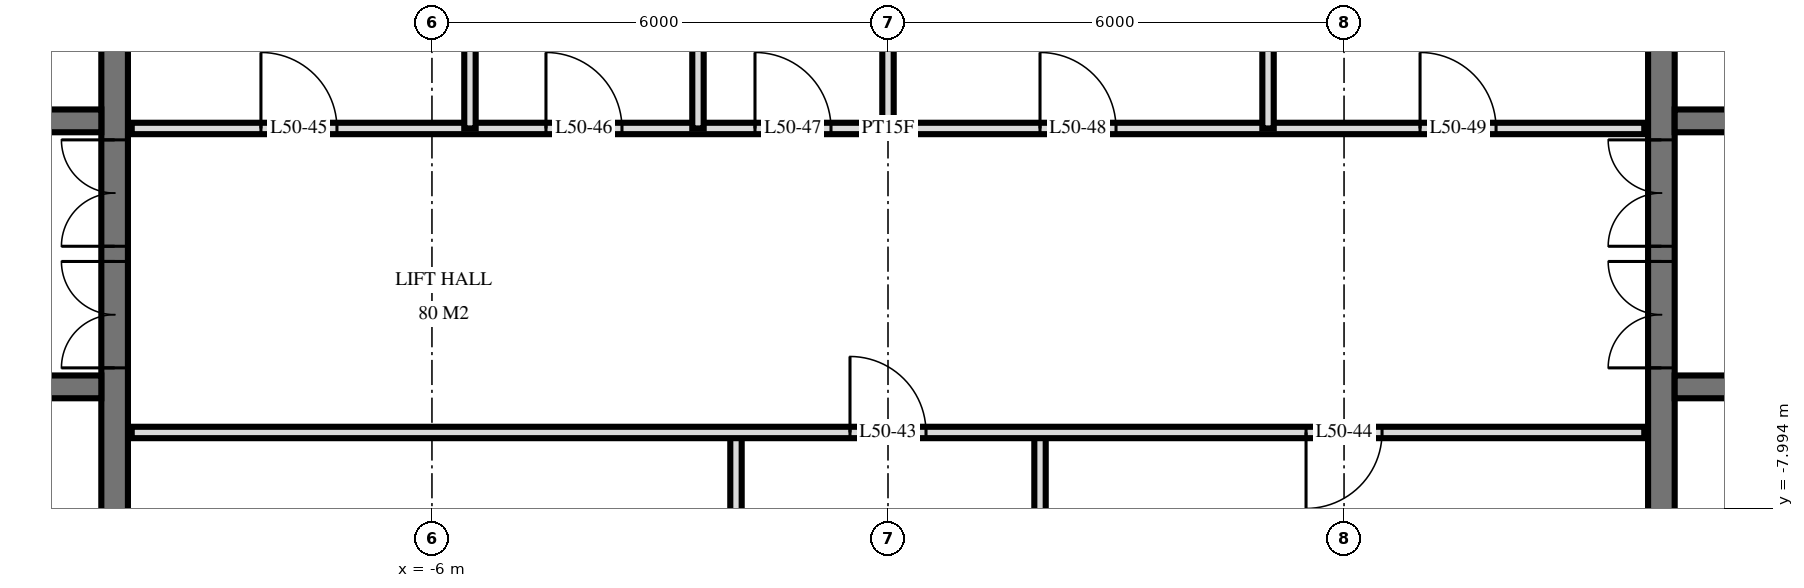
"""IFC4 building model, lengths in metres.
Left out: names, types, materials, properties, quantities, classifications, styles, units other than length and angle.
Written with IfcOpenShell. Run it as: python <this file> out.ifc"""

import sys

from ifc_helpers import new_model, si_unit, direction, frame, frame_2d, origin, place, context, subcontext, project, spatial, rectangle, extrude, element, fill, save


model = new_model("IFC4")
c1 = context("Model", 3, precision=1e-05, world=origin(), true_north=direction((0.0, 1.0)))
c2 = subcontext(c1, "Body", "Model", "MODEL_VIEW")
j1 = project(units=[si_unit("LENGTHUNIT", "METRE"), si_unit("PLANEANGLEUNIT", "RADIAN")], contexts=[c1])
p1 = place(None, origin())
s1 = spatial("IfcSite", under=j1, at=p1, CompositionType="ELEMENT")
p2 = place(p1, origin())
s2 = spatial("IfcBuilding", under=s1, at=p2, CompositionType="ELEMENT")
p3 = place(p2, frame((0.0, 0.0, 194.1)))
s3 = spatial("IfcBuildingStorey", under=s2, at=p3, CompositionType="ELEMENT", Elevation=194.1)
p4 = place(p3, frame((-10.175, -14.55, 0.0), z_axis=(0.0, 0.0, 1.0), x_axis=(0.0, 1.0, 0.0)))
e1 = element("IfcWall", 1, at=p4, inside=s3, PredefinedType="SHEAR", context=c2, shape_type="SweptSolid", body=[
    extrude(rectangle(XDim=14.1, YDim=0.35, at=frame_2d((7.05, 0.0))), origin(), (0.0, 0.0, 1.0), 3.5),
])
p5 = place(p4, frame((8.4, 0.0, 0.0)))
e2 = element("IfcOpeningElement", 2, at=p5, cuts=e1, PredefinedType="OPENING", context=c2, shape_type="SweptSolid", body=[
    extrude(rectangle(XDim=1.4, YDim=2.4, at=frame_2d((0.7, 1.2))), frame((0.0, 0.185, 0.0), z_axis=(0.0, -1.0, 0.0), x_axis=(1.0, 0.0, 0.0)), (0.0, 0.0, 1.0), 0.37),
])
p6 = place(p4, frame((10.0, 0.0, 0.0)))
e3 = element("IfcOpeningElement", 3, at=p6, cuts=e1, PredefinedType="OPENING", context=c2, shape_type="SweptSolid", body=[
    extrude(rectangle(XDim=1.4, YDim=2.4, at=frame_2d((0.7, 1.2))), frame((0.0, 0.185, 0.0), z_axis=(0.0, -1.0, 0.0), x_axis=(1.0, 0.0, 0.0)), (0.0, 0.0, 1.0), 0.37),
])
p7 = place(p4, frame((4.0, 0.0, 0.0)))
e4 = element("IfcOpeningElement", 4, at=p7, cuts=e1, PredefinedType="OPENING", context=c2, shape_type="SweptSolid", body=[
    extrude(rectangle(XDim=1.2, YDim=2.1, at=frame_2d((0.6, 1.05))), frame((0.0, 0.185, 0.0), z_axis=(0.0, -1.0, 0.0), x_axis=(1.0, 0.0, 0.0)), (0.0, 0.0, 1.0), 0.37),
])
p8 = place(p3, frame((-24.05, -2.9, 0.0), z_axis=(0.0, 0.0, 1.0), x_axis=(1.0, 0.0, 0.0)))
e5 = element("IfcWall", 5, at=p8, inside=s3, PredefinedType="SHEAR", context=c2, shape_type="SweptSolid", body=[
    extrude(rectangle(XDim=13.7, YDim=0.3, at=frame_2d((6.85, 0.0))), origin(), (0.0, 0.0, 1.0), 3.5),
])
p9 = place(p8, frame((0.55, 0.0, 0.0)))
e6 = element("IfcOpeningElement", 6, at=p9, cuts=e5, PredefinedType="OPENING", context=c2, shape_type="SweptSolid", body=[
    extrude(rectangle(XDim=1.1, YDim=2.1, at=frame_2d((0.55, 1.05))), frame((0.0, 0.16, 0.0), z_axis=(0.0, -1.0, 0.0), x_axis=(1.0, 0.0, 0.0)), (0.0, 0.0, 1.0), 0.32),
])
p10 = place(p8, frame((5.9, 0.0, 0.0)))
e7 = element("IfcOpeningElement", 7, at=p10, cuts=e5, PredefinedType="OPENING", context=c2, shape_type="SweptSolid", body=[
    extrude(rectangle(XDim=0.9, YDim=2.1, at=frame_2d((0.45, 1.05))), frame((0.0, 0.16, 0.0), z_axis=(0.0, -1.0, 0.0), x_axis=(1.0, 0.0, 0.0)), (0.0, 0.0, 1.0), 0.32),
])
p11 = place(p8, frame((11.85, 0.0, 0.0)))
e8 = element("IfcOpeningElement", 8, at=p11, cuts=e5, PredefinedType="OPENING", context=c2, shape_type="SweptSolid", body=[
    extrude(rectangle(XDim=1.0, YDim=2.1, at=frame_2d((0.5, 1.05))), frame((0.0, 0.16, 0.0), z_axis=(0.0, -1.0, 0.0), x_axis=(1.0, 0.0, 0.0)), (0.0, 0.0, 1.0), 0.32),
])
p12 = place(p8, frame((8.85, 0.0, 0.0)))
e9 = element("IfcOpeningElement", 9, at=p12, cuts=e5, PredefinedType="OPENING", context=c2, shape_type="SweptSolid", body=[
    extrude(rectangle(XDim=1.0, YDim=2.1, at=frame_2d((0.5, 1.05))), frame((0.0, 0.16, 0.0), z_axis=(0.0, -1.0, 0.0), x_axis=(1.0, 0.0, 0.0)), (0.0, 0.0, 1.0), 0.32),
])
p13 = place(p8, frame((3.0, 0.0, 0.0)))
e10 = element("IfcOpeningElement", 10, at=p13, cuts=e5, PredefinedType="OPENING", context=c2, shape_type="SweptSolid", body=[
    extrude(rectangle(XDim=1.0, YDim=2.1, at=frame_2d((0.5, 1.05))), frame((0.0, 0.16, 0.0), z_axis=(0.0, -1.0, 0.0), x_axis=(1.0, 0.0, 0.0)), (0.0, 0.0, 1.0), 0.32),
])
p14 = place(p3, frame((-24.05, -6.4, 0.0), z_axis=(0.0, 0.0, 1.0), x_axis=(1.0, 0.0, 0.0)))
e11 = element("IfcWall", 11, at=p14, inside=s3, PredefinedType="SHEAR", context=c2, shape_type="SweptSolid", body=[
    extrude(rectangle(XDim=13.7, YDim=0.3, at=frame_2d((6.85, 0.0))), origin(), (0.0, 0.0, 1.0), 3.5),
])
p15 = place(p14, frame((0.55, 0.0, 0.0)))
e12 = element("IfcOpeningElement", 12, at=p15, cuts=e11, PredefinedType="OPENING", context=c2, shape_type="SweptSolid", body=[
    extrude(rectangle(XDim=1.1, YDim=2.1, at=frame_2d((0.55, 1.05))), frame((0.0, 0.16, 0.0), z_axis=(0.0, -1.0, 0.0), x_axis=(1.0, 0.0, 0.0)), (0.0, 0.0, 1.0), 0.32),
])
p16 = place(p14, frame((5.8, 0.0, 0.0)))
e13 = element("IfcOpeningElement", 13, at=p16, cuts=e11, PredefinedType="OPENING", context=c2, shape_type="SweptSolid", body=[
    extrude(rectangle(XDim=1.1, YDim=2.1, at=frame_2d((0.55, 1.05))), frame((0.0, 0.16, 0.0), z_axis=(0.0, -1.0, 0.0), x_axis=(1.0, 0.0, 0.0)), (0.0, 0.0, 1.0), 0.32),
])
p17 = place(p3, frame((10.175, -14.55, 0.0), z_axis=(0.0, 0.0, 1.0), x_axis=(0.0, 1.0, 0.0)))
e14 = element("IfcWall", 14, at=p17, inside=s3, PredefinedType="SHEAR", context=c2, shape_type="SweptSolid", body=[
    extrude(rectangle(XDim=14.1, YDim=0.35, at=frame_2d((7.05, 0.0))), origin(), (0.0, 0.0, 1.0), 3.5),
])
p18 = place(p17, frame((8.4, 0.0, 0.0)))
e15 = element("IfcOpeningElement", 15, at=p18, cuts=e14, PredefinedType="OPENING", context=c2, shape_type="SweptSolid", body=[
    extrude(rectangle(XDim=1.4, YDim=2.4, at=frame_2d((0.7, 1.2))), frame((0.0, 0.185, 0.0), z_axis=(0.0, -1.0, 0.0), x_axis=(1.0, 0.0, 0.0)), (0.0, 0.0, 1.0), 0.37),
])
p19 = place(p17, frame((10.0, 0.0, 0.0)))
e16 = element("IfcOpeningElement", 16, at=p19, cuts=e14, PredefinedType="OPENING", context=c2, shape_type="SweptSolid", body=[
    extrude(rectangle(XDim=1.4, YDim=2.4, at=frame_2d((0.7, 1.2))), frame((0.0, 0.185, 0.0), z_axis=(0.0, -1.0, 0.0), x_axis=(1.0, 0.0, 0.0)), (0.0, 0.0, 1.0), 0.37),
])
p20 = place(p17, frame((4.0, 0.0, 0.0)))
e17 = element("IfcOpeningElement", 17, at=p20, cuts=e14, PredefinedType="OPENING", context=c2, shape_type="SweptSolid", body=[
    extrude(rectangle(XDim=1.2, YDim=2.1, at=frame_2d((0.6, 1.05))), frame((0.0, 0.185, 0.0), z_axis=(0.0, -1.0, 0.0), x_axis=(1.0, 0.0, 0.0)), (0.0, 0.0, 1.0), 0.37),
])
p21 = place(p3, frame((10.35, -2.9, 0.0), z_axis=(0.0, 0.0, 1.0), x_axis=(1.0, 0.0, 0.0)))
e18 = element("IfcWall", 18, at=p21, inside=s3, PredefinedType="SHEAR", context=c2, shape_type="SweptSolid", body=[
    extrude(rectangle(XDim=13.7, YDim=0.3, at=frame_2d((6.85, 0.0))), origin(), (0.0, 0.0, 1.0), 3.5),
])
p22 = place(p21, frame((12.05, 0.0, 0.0)))
e19 = element("IfcOpeningElement", 19, at=p22, cuts=e18, PredefinedType="OPENING", context=c2, shape_type="SweptSolid", body=[
    extrude(rectangle(XDim=1.1, YDim=2.1, at=frame_2d((0.55, 1.05))), frame((0.0, 0.16, 0.0), z_axis=(0.0, -1.0, 0.0), x_axis=(1.0, 0.0, 0.0)), (0.0, 0.0, 1.0), 0.32),
])
p23 = place(p21, frame((6.9, 0.0, 0.0)))
e20 = element("IfcOpeningElement", 20, at=p23, cuts=e18, PredefinedType="OPENING", context=c2, shape_type="SweptSolid", body=[
    extrude(rectangle(XDim=0.9, YDim=2.1, at=frame_2d((0.45, 1.05))), frame((0.0, 0.16, 0.0), z_axis=(0.0, -1.0, 0.0), x_axis=(1.0, 0.0, 0.0)), (0.0, 0.0, 1.0), 0.32),
])
p24 = place(p21, frame((0.85, 0.0, 0.0)))
e21 = element("IfcOpeningElement", 21, at=p24, cuts=e18, PredefinedType="OPENING", context=c2, shape_type="SweptSolid", body=[
    extrude(rectangle(XDim=1.0, YDim=2.1, at=frame_2d((0.5, 1.05))), frame((0.0, 0.16, 0.0), z_axis=(0.0, -1.0, 0.0), x_axis=(1.0, 0.0, 0.0)), (0.0, 0.0, 1.0), 0.32),
])
p25 = place(p21, frame((3.85, 0.0, 0.0)))
e22 = element("IfcOpeningElement", 22, at=p25, cuts=e18, PredefinedType="OPENING", context=c2, shape_type="SweptSolid", body=[
    extrude(rectangle(XDim=1.0, YDim=2.1, at=frame_2d((0.5, 1.05))), frame((0.0, 0.16, 0.0), z_axis=(0.0, -1.0, 0.0), x_axis=(1.0, 0.0, 0.0)), (0.0, 0.0, 1.0), 0.32),
])
p26 = place(p21, frame((9.7, 0.0, 0.0)))
e23 = element("IfcOpeningElement", 23, at=p26, cuts=e18, PredefinedType="OPENING", context=c2, shape_type="SweptSolid", body=[
    extrude(rectangle(XDim=1.0, YDim=2.1, at=frame_2d((0.5, 1.05))), frame((0.0, 0.16, 0.0), z_axis=(0.0, -1.0, 0.0), x_axis=(1.0, 0.0, 0.0)), (0.0, 0.0, 1.0), 0.32),
])
p27 = place(p3, frame((10.35, -6.4, 0.0), z_axis=(0.0, 0.0, 1.0), x_axis=(1.0, 0.0, 0.0)))
e24 = element("IfcWall", 24, at=p27, inside=s3, PredefinedType="SHEAR", context=c2, shape_type="SweptSolid", body=[
    extrude(rectangle(XDim=13.7, YDim=0.3, at=frame_2d((6.85, 0.0))), origin(), (0.0, 0.0, 1.0), 3.5),
])
p28 = place(p27, frame((12.05, 0.0, 0.0)))
e25 = element("IfcOpeningElement", 25, at=p28, cuts=e24, PredefinedType="OPENING", context=c2, shape_type="SweptSolid", body=[
    extrude(rectangle(XDim=1.1, YDim=2.1, at=frame_2d((0.55, 1.05))), frame((0.0, 0.16, 0.0), z_axis=(0.0, -1.0, 0.0), x_axis=(1.0, 0.0, 0.0)), (0.0, 0.0, 1.0), 0.32),
])
p29 = place(p27, frame((6.8, 0.0, 0.0)))
e26 = element("IfcOpeningElement", 26, at=p29, cuts=e24, PredefinedType="OPENING", context=c2, shape_type="SweptSolid", body=[
    extrude(rectangle(XDim=1.1, YDim=2.1, at=frame_2d((0.55, 1.05))), frame((0.0, 0.16, 0.0), z_axis=(0.0, -1.0, 0.0), x_axis=(1.0, 0.0, 0.0)), (0.0, 0.0, 1.0), 0.32),
])
p30 = place(p3, frame((5.0, -3.0, 0.0), z_axis=(0.0, 0.0, 1.0), x_axis=(0.0, 1.0, 0.0)))
e27 = element("IfcWall", 27, at=p30, inside=s3, PredefinedType="PARTITIONING", context=c2, shape_type="SweptSolid", body=[
    extrude(rectangle(XDim=4.02, YDim=0.15, at=frame_2d((2.01, 0.0))), origin(), (0.0, 0.0, 1.0), 3.22),
])
p31 = place(p3, frame((2.0, -11.0, 0.0), z_axis=(0.0, 0.0, 1.0), x_axis=(0.0, 1.0, 0.0)))
e28 = element("IfcWall", 28, at=p31, inside=s3, PredefinedType="PARTITIONING", context=c2, shape_type="SweptSolid", body=[
    extrude(rectangle(XDim=4.0, YDim=0.15, at=frame_2d((2.0, 0.0))), origin(), (0.0, 0.0, 1.0), 3.22),
])
p32 = place(p3, frame((0.0, -3.0, 0.0), z_axis=(0.0, 0.0, 1.0), x_axis=(0.0, 1.0, 0.0)))
e29 = element("IfcWall", 29, at=p32, inside=s3, PredefinedType="PLUMBINGWALL", context=c2, shape_type="SweptSolid", body=[
    extrude(rectangle(XDim=4.02, YDim=0.15, at=frame_2d((2.01, 0.0))), origin(), (0.0, 0.0, 1.0), 3.22),
])
p33 = place(p3, frame((-2.0, -11.0, 0.0), z_axis=(0.0, 0.0, 1.0), x_axis=(0.0, 1.0, 0.0)))
e30 = element("IfcWall", 30, at=p33, inside=s3, PredefinedType="PARTITIONING", context=c2, shape_type="SweptSolid", body=[
    extrude(rectangle(XDim=4.0, YDim=0.15, at=frame_2d((2.0, 0.0))), origin(), (0.0, 0.0, 1.0), 3.22),
])
for number, where, z_axis, x_axis in (
    (31, (-2.5, -3.0, 0.0), (0.0, 0.0, 1.0), (0.0, 1.0, 0.0)),
    (32, (-5.5, -3.0, 0.0), (0.0, 0.0, 1.0), (0.0, 1.0, 0.0)),
):
    element("IfcWall", number, at=place(p3, frame(where, z_axis=z_axis, x_axis=x_axis)), inside=s3, PredefinedType="PLUMBINGWALL", context=c2, shape_type="SweptSolid", body=[
        extrude(rectangle(XDim=4.02, YDim=0.15, at=frame_2d((2.01, 0.0))), origin(), (0.0, 0.0, 1.0), 3.22),
    ])
p34 = place(p3, frame((-9.95, -7.0, 0.0), z_axis=(0.0, 0.0, 1.0), x_axis=(1.0, 0.0, 0.0)))
e33 = element("IfcWall", 33, at=p34, inside=s3, PredefinedType="PARTITIONING", context=c2, shape_type="SweptSolid", body=[
    extrude(rectangle(XDim=19.9, YDim=0.15, at=frame_2d((9.95, 0.0))), origin(), (0.0, 0.0, 1.0), 3.22),
])
p35 = place(p34, frame((9.45, 0.0, 0.0)))
e34 = element("IfcOpeningElement", 34, at=p35, cuts=e33, PredefinedType="OPENING", context=c2, shape_type="SweptSolid", body=[
    extrude(rectangle(XDim=1.0, YDim=2.1, at=frame_2d((0.5, 1.05))), frame((0.0, 0.085, 0.0), z_axis=(0.0, -1.0, 0.0), x_axis=(1.0, 0.0, 0.0)), (0.0, 0.0, 1.0), 0.17),
])
p36 = place(p34, frame((15.45, 0.0, 0.0)))
e35 = element("IfcOpeningElement", 35, at=p36, cuts=e33, PredefinedType="OPENING", context=c2, shape_type="SweptSolid", body=[
    extrude(rectangle(XDim=1.0, YDim=2.1, at=frame_2d((0.5, 1.05))), frame((0.0, 0.085, 0.0), z_axis=(0.0, -1.0, 0.0), x_axis=(1.0, 0.0, 0.0)), (0.0, 0.0, 1.0), 0.17),
])
p37 = place(p3, frame((-9.95, -3.0, 0.0), z_axis=(0.0, 0.0, 1.0), x_axis=(1.0, 0.0, 0.0)))
e36 = element("IfcWall", 36, at=p37, inside=s3, PredefinedType="PARTITIONING", context=c2, shape_type="SweptSolid", body=[
    extrude(rectangle(XDim=19.9, YDim=0.15, at=frame_2d((9.95, 0.0))), origin(), (0.0, 0.0, 1.0), 3.22),
])
p38 = place(p37, frame((1.7, 0.0, 0.0)))
e37 = element("IfcOpeningElement", 37, at=p38, cuts=e36, PredefinedType="OPENING", context=c2, shape_type="SweptSolid", body=[
    extrude(rectangle(XDim=1.0, YDim=2.1, at=frame_2d((0.5, 1.05))), frame((0.0, 0.085, 0.0), z_axis=(0.0, -1.0, 0.0), x_axis=(1.0, 0.0, 0.0)), (0.0, 0.0, 1.0), 0.17),
])
p39 = place(p37, frame((5.45, 0.0, 0.0)))
e38 = element("IfcOpeningElement", 38, at=p39, cuts=e36, PredefinedType="OPENING", context=c2, shape_type="SweptSolid", body=[
    extrude(rectangle(XDim=1.0, YDim=2.1, at=frame_2d((0.5, 1.05))), frame((0.0, 0.085, 0.0), z_axis=(0.0, -1.0, 0.0), x_axis=(1.0, 0.0, 0.0)), (0.0, 0.0, 1.0), 0.17),
])
p40 = place(p37, frame((8.2, 0.0, 0.0)))
e39 = element("IfcOpeningElement", 39, at=p40, cuts=e36, PredefinedType="OPENING", context=c2, shape_type="SweptSolid", body=[
    extrude(rectangle(XDim=1.0, YDim=2.1, at=frame_2d((0.5, 1.05))), frame((0.0, 0.085, 0.0), z_axis=(0.0, -1.0, 0.0), x_axis=(1.0, 0.0, 0.0)), (0.0, 0.0, 1.0), 0.17),
])
p41 = place(p37, frame((11.95, 0.0, 0.0)))
e40 = element("IfcOpeningElement", 40, at=p41, cuts=e36, PredefinedType="OPENING", context=c2, shape_type="SweptSolid", body=[
    extrude(rectangle(XDim=1.0, YDim=2.1, at=frame_2d((0.5, 1.05))), frame((0.0, 0.085, 0.0), z_axis=(0.0, -1.0, 0.0), x_axis=(1.0, 0.0, 0.0)), (0.0, 0.0, 1.0), 0.17),
])
p42 = place(p37, frame((16.95, 0.0, 0.0)))
e41 = element("IfcOpeningElement", 41, at=p42, cuts=e36, PredefinedType="OPENING", context=c2, shape_type="SweptSolid", body=[
    extrude(rectangle(XDim=1.0, YDim=2.1, at=frame_2d((0.5, 1.05))), frame((0.0, 0.085, 0.0), z_axis=(0.0, -1.0, 0.0), x_axis=(1.0, 0.0, 0.0)), (0.0, 0.0, 1.0), 0.17),
])
p43 = place(p5, origin())
e42 = element("IfcDoor", 42, at=p43, inside=s3, OperationType="DOUBLE_DOOR_SINGLE_SWING", PredefinedType="DOOR", context=c2, shape_type="SweptSolid", body=[
    extrude(rectangle(XDim=1.4, YDim=2.4, at=frame_2d((0.7, 1.2))), frame((0.0, 0.025, 0.0), z_axis=(0.0, -1.0, 0.0), x_axis=(1.0, 0.0, 0.0)), (0.0, 0.0, 1.0), 0.05),
])
fill(e2, e42)
p44 = place(p6, origin())
e43 = element("IfcDoor", 43, at=p44, inside=s3, OperationType="DOUBLE_DOOR_SINGLE_SWING", PredefinedType="DOOR", context=c2, shape_type="SweptSolid", body=[
    extrude(rectangle(XDim=1.4, YDim=2.4, at=frame_2d((0.7, 1.2))), frame((0.0, 0.025, 0.0), z_axis=(0.0, -1.0, 0.0), x_axis=(1.0, 0.0, 0.0)), (0.0, 0.0, 1.0), 0.05),
])
fill(e3, e43)
p45 = place(p18, origin())
e44 = element("IfcDoor", 44, at=p45, inside=s3, OperationType="DOUBLE_DOOR_SINGLE_SWING", PredefinedType="DOOR", context=c2, shape_type="SweptSolid", body=[
    extrude(rectangle(XDim=1.4, YDim=2.4, at=frame_2d((0.7, 1.2))), frame((0.0, 0.025, 0.0), z_axis=(0.0, -1.0, 0.0), x_axis=(1.0, 0.0, 0.0)), (0.0, 0.0, 1.0), 0.05),
])
fill(e15, e44)
p46 = place(p19, origin())
e45 = element("IfcDoor", 45, at=p46, inside=s3, OperationType="DOUBLE_DOOR_SINGLE_SWING", PredefinedType="DOOR", context=c2, shape_type="SweptSolid", body=[
    extrude(rectangle(XDim=1.4, YDim=2.4, at=frame_2d((0.7, 1.2))), frame((0.0, 0.025, 0.0), z_axis=(0.0, -1.0, 0.0), x_axis=(1.0, 0.0, 0.0)), (0.0, 0.0, 1.0), 0.05),
])
fill(e16, e45)
p47 = place(p35, origin())
e46 = element("IfcDoor", 46, at=p47, inside=s3, OperationType="SINGLE_SWING_RIGHT", PredefinedType="DOOR", context=c2, shape_type="SweptSolid", body=[
    extrude(rectangle(XDim=1.0, YDim=2.1, at=frame_2d((0.5, 1.05))), frame((0.0, 0.025, 0.0), z_axis=(0.0, -1.0, 0.0), x_axis=(1.0, 0.0, 0.0)), (0.0, 0.0, 1.0), 0.05),
])
fill(e34, e46)
p48 = place(p36, frame((0.5, 0.0, 0.0), z_axis=(0.0, 0.0, 1.0), x_axis=(-1.0, 0.0, 0.0)))
e47 = element("IfcDoor", 47, at=p48, inside=s3, OperationType="SINGLE_SWING_LEFT", PredefinedType="DOOR", context=c2, shape_type="SweptSolid", body=[
    extrude(rectangle(XDim=1.0, YDim=2.1, at=frame_2d((0.0, 1.05))), frame((0.0, -0.025, 0.0), z_axis=(0.0, 1.0, 0.0), x_axis=(-1.0, 0.0, 0.0)), (0.0, 0.0, 1.0), 0.05),
])
fill(e35, e47)
p49 = place(p38, origin())
e48 = element("IfcDoor", 48, at=p49, inside=s3, OperationType="SINGLE_SWING_RIGHT", PredefinedType="DOOR", context=c2, shape_type="SweptSolid", body=[
    extrude(rectangle(XDim=1.0, YDim=2.1, at=frame_2d((0.5, 1.05))), frame((0.0, 0.025, 0.0), z_axis=(0.0, -1.0, 0.0), x_axis=(1.0, 0.0, 0.0)), (0.0, 0.0, 1.0), 0.05),
])
fill(e37, e48)
p50 = place(p39, origin())
e49 = element("IfcDoor", 49, at=p50, inside=s3, OperationType="SINGLE_SWING_RIGHT", PredefinedType="DOOR", context=c2, shape_type="SweptSolid", body=[
    extrude(rectangle(XDim=1.0, YDim=2.1, at=frame_2d((0.5, 1.05))), frame((0.0, 0.025, 0.0), z_axis=(0.0, -1.0, 0.0), x_axis=(1.0, 0.0, 0.0)), (0.0, 0.0, 1.0), 0.05),
])
fill(e38, e49)
p51 = place(p40, origin())
e50 = element("IfcDoor", 50, at=p51, inside=s3, OperationType="SINGLE_SWING_RIGHT", PredefinedType="DOOR", context=c2, shape_type="SweptSolid", body=[
    extrude(rectangle(XDim=1.0, YDim=2.1, at=frame_2d((0.5, 1.05))), frame((0.0, 0.025, 0.0), z_axis=(0.0, -1.0, 0.0), x_axis=(1.0, 0.0, 0.0)), (0.0, 0.0, 1.0), 0.05),
])
fill(e39, e50)
p52 = place(p41, origin())
e51 = element("IfcDoor", 51, at=p52, inside=s3, OperationType="SINGLE_SWING_RIGHT", PredefinedType="DOOR", context=c2, shape_type="SweptSolid", body=[
    extrude(rectangle(XDim=1.0, YDim=2.1, at=frame_2d((0.5, 1.05))), frame((0.0, 0.025, 0.0), z_axis=(0.0, -1.0, 0.0), x_axis=(1.0, 0.0, 0.0)), (0.0, 0.0, 1.0), 0.05),
])
fill(e40, e51)
p53 = place(p42, origin())
e52 = element("IfcDoor", 52, at=p53, inside=s3, OperationType="SINGLE_SWING_RIGHT", PredefinedType="DOOR", context=c2, shape_type="SweptSolid", body=[
    extrude(rectangle(XDim=1.0, YDim=2.1, at=frame_2d((0.5, 1.05))), frame((0.0, 0.025, 0.0), z_axis=(0.0, -1.0, 0.0), x_axis=(1.0, 0.0, 0.0)), (0.0, 0.0, 1.0), 0.05),
])
fill(e41, e52)
save(model, sys.argv[1])
